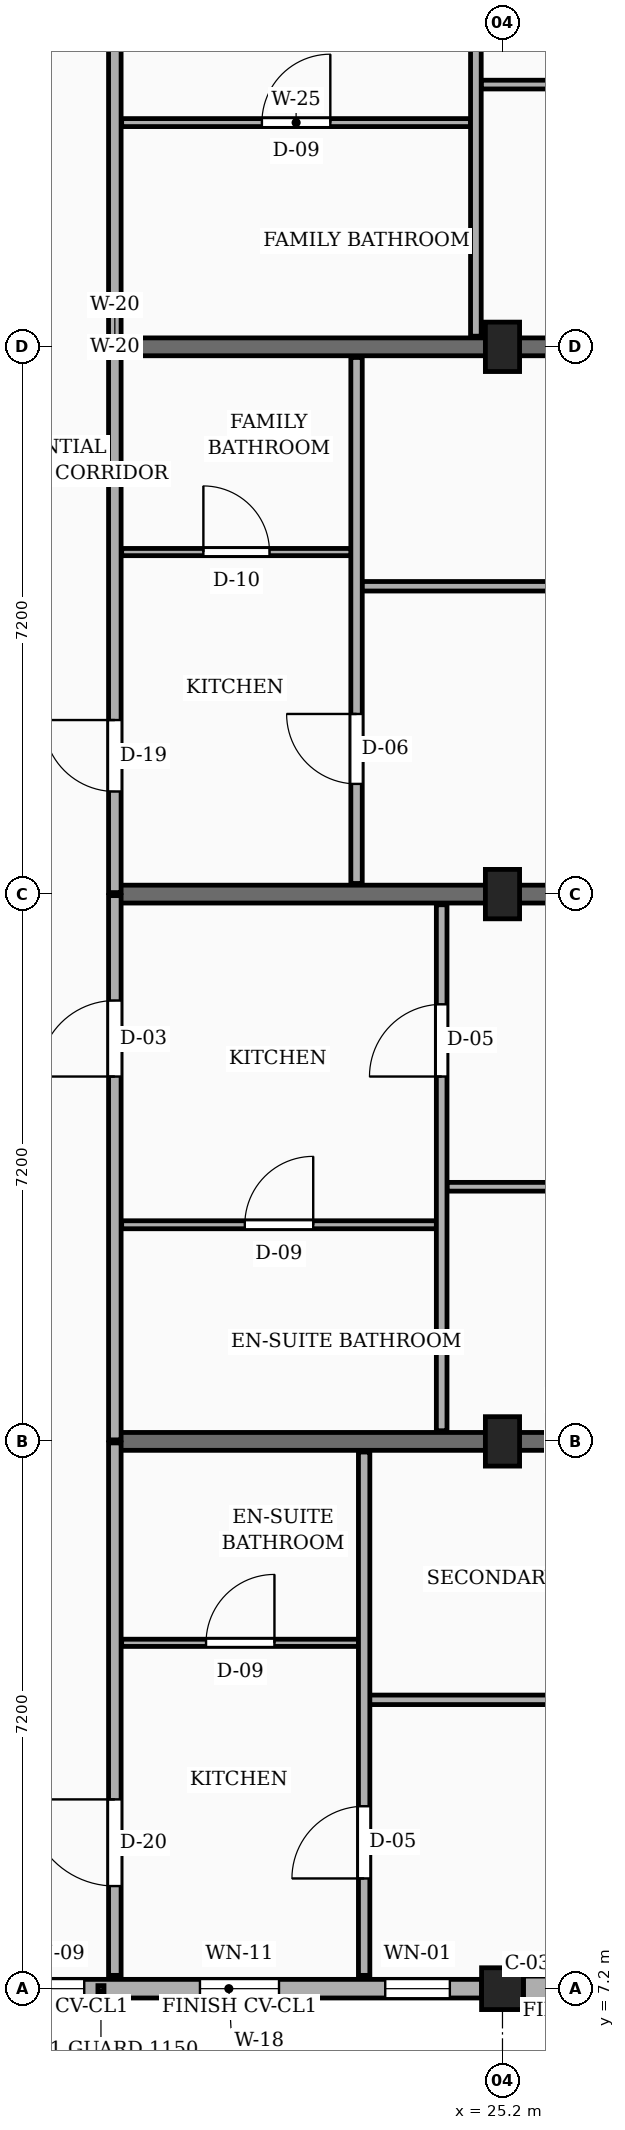
"""IFC4 building model, lengths in metres.
Left out: names, types, materials, properties, quantities, classifications, styles, units other than length and angle.
Written with IfcOpenShell. Run it as: python <this file> out.ifc"""

import sys

from ifc_helpers import new_model, si_unit, direction, frame, frame_2d, origin, origin_2d, place, context, subcontext, project, spatial, rectangle, extrude, element, fill, save


model = new_model("IFC4")
c1 = context("Model", 3, precision=1e-05, world=origin(), true_north=direction((0.0, 1.0)))
c2 = subcontext(c1, "Body", "Model", "MODEL_VIEW")
j1 = project(units=[si_unit("LENGTHUNIT", "METRE"), si_unit("PLANEANGLEUNIT", "RADIAN")], contexts=[c1])
p1 = place(None, origin())
s1 = spatial("IfcSite", under=j1, at=p1, CompositionType="ELEMENT")
p2 = place(p1, origin())
s2 = spatial("IfcBuilding", under=s1, at=p2, CompositionType="ELEMENT")
p3 = place(p2, frame((0.0, 0.0, 13.95)))
s3 = spatial("IfcBuildingStorey", under=s2, at=p3, CompositionType="ELEMENT", Elevation=13.95)
p4 = place(p3, frame((25.2, 7.2, 0.0), z_axis=(0.0, 0.0, 1.0), x_axis=(1.0, 0.0, 0.0)))
e1 = element("IfcColumn", 1, at=p4, inside=s3, PredefinedType="COLUMN", context=c2, shape_type="SweptSolid", body=[
    extrude(rectangle(XDim=0.55, YDim=0.55, at=origin_2d()), origin(), (0.0, 0.0, 1.0), 3.15),
])
for number, where, z_axis, x_axis in (
    (2, (25.2, 14.4, 0.0), (0.0, 0.0, 1.0), (1.0, 0.0, 0.0)),
    (3, (25.2, 21.6, 0.0), (0.0, 0.0, 1.0), (1.0, 0.0, 0.0)),
    (4, (25.2, 28.8, 0.0), (0.0, 0.0, 1.0), (1.0, 0.0, 0.0)),
):
    element("IfcColumn", number, at=place(p3, frame(where, z_axis=z_axis, x_axis=x_axis)), inside=s3, PredefinedType="COLUMN", context=c2, shape_type="SweptSolid", body=[
        extrude(rectangle(XDim=0.45, YDim=0.65, at=origin_2d()), origin(), (0.0, 0.0, 1.0), 3.15),
    ])
for number, where, z_axis, x_axis in (
    (5, (20.1, 14.4, 0.0), (0.0, 0.0, 1.0), (1.0, 0.0, 0.0)),
    (6, (20.1, 21.6, 0.0), (0.0, 0.0, 1.0), (1.0, 0.0, 0.0)),
    (7, (20.1, 28.8, 0.0), (0.0, 0.0, 1.0), (1.0, 0.0, 0.0)),
):
    element("IfcWall", number, at=place(p3, frame(where, z_axis=z_axis, x_axis=x_axis)), inside=s3, PredefinedType="SOLIDWALL", context=c2, shape_type="SweptSolid", body=[
        extrude(rectangle(XDim=12.025, YDim=0.235, at=frame_2d((6.012, 0.0))), origin(), (0.0, 0.0, 1.0), 2.17),
    ])
p5 = place(p3, frame((18.275, 7.2, 0.0), z_axis=(0.0, 0.0, 1.0), x_axis=(1.0, 0.0, 0.0)))
e8 = element("IfcWall", 8, at=p5, inside=s3, PredefinedType="SOLIDWALL", context=c2, shape_type="SweptSolid", body=[
    extrude(rectangle(XDim=6.65, YDim=0.245, at=frame_2d((3.325, 0.0))), origin(), (0.0, 0.0, 1.0), 2.44),
])
p6 = place(p5, frame((0.542, 0.0, 0.78)))
e9 = element("IfcOpeningElement", 9, at=p6, cuts=e8, PredefinedType="OPENING", context=c2, shape_type="SweptSolid", body=[
    extrude(rectangle(XDim=0.88, YDim=1.26, at=frame_2d((0.44, 0.63))), frame((0.0, 0.133, 0.0), z_axis=(0.0, -1.0, 0.0), x_axis=(1.0, 0.0, 0.0)), (0.0, 0.0, 1.0), 0.265),
])
p7 = place(p5, frame((2.945, 0.0, 0.78)))
e10 = element("IfcOpeningElement", 10, at=p7, cuts=e8, PredefinedType="OPENING", context=c2, shape_type="SweptSolid", body=[
    extrude(rectangle(XDim=1.04, YDim=1.26, at=frame_2d((0.52, 0.63))), frame((0.0, 0.133, 0.0), z_axis=(0.0, -1.0, 0.0), x_axis=(1.0, 0.0, 0.0)), (0.0, 0.0, 1.0), 0.265),
])
p8 = place(p5, frame((5.383, 0.0, 0.78)))
e11 = element("IfcOpeningElement", 11, at=p8, cuts=e8, PredefinedType="OPENING", context=c2, shape_type="SweptSolid", body=[
    extrude(rectangle(XDim=0.85, YDim=1.15, at=frame_2d((0.425, 0.575))), frame((0.0, 0.133, 0.0), z_axis=(0.0, -1.0, 0.0), x_axis=(1.0, 0.0, 0.0)), (0.0, 0.0, 1.0), 0.265),
])
p9 = place(p3, frame((25.475, 7.2, 0.0), z_axis=(0.0, 0.0, 1.0), x_axis=(1.0, 0.0, 0.0)))
e12 = element("IfcWall", 12, at=p9, inside=s3, PredefinedType="SOLIDWALL", context=c2, shape_type="SweptSolid", body=[
    extrude(rectangle(XDim=6.65, YDim=0.33, at=frame_2d((3.325, 0.0))), origin(), (0.0, 0.0, 1.0), 2.44),
])
p10 = place(p9, frame((0.45, 0.0, 0.78)))
e13 = element("IfcOpeningElement", 13, at=p10, cuts=e12, PredefinedType="OPENING", context=c2, shape_type="SweptSolid", body=[
    extrude(rectangle(XDim=1.12, YDim=1.26, at=frame_2d((0.56, 0.63))), frame((0.0, 0.175, 0.0), z_axis=(0.0, -1.0, 0.0), x_axis=(1.0, 0.0, 0.0)), (0.0, 0.0, 1.0), 0.35),
])
p11 = place(p9, frame((4.65, 0.0, 0.78)))
e14 = element("IfcOpeningElement", 14, at=p11, cuts=e12, PredefinedType="OPENING", context=c2, shape_type="SweptSolid", body=[
    extrude(rectangle(XDim=1.28, YDim=1.26, at=frame_2d((0.64, 0.63))), frame((0.0, 0.175, 0.0), z_axis=(0.0, -1.0, 0.0), x_axis=(1.0, 0.0, 0.0)), (0.0, 0.0, 1.0), 0.35),
])
p12 = place(p3, frame((20.1, 7.375, 0.0), z_axis=(0.0, 0.0, 1.0), x_axis=(0.0, 1.0, 0.0)))
e15 = element("IfcWall", 15, at=p12, inside=s3, PredefinedType="PARTITIONING", context=c2, shape_type="SweptSolid", body=[
    extrude(rectangle(XDim=7.005, YDim=0.165, at=frame_2d((3.502, 0.0))), origin(), (0.0, 0.0, 1.0), 2.305),
])
p13 = place(p12, frame((1.175, 0.0, 0.0)))
e16 = element("IfcOpeningElement", 16, at=p13, cuts=e15, PredefinedType="OPENING", context=c2, shape_type="SweptSolid", body=[
    extrude(rectangle(XDim=1.14, YDim=2.18, at=frame_2d((0.57, 1.09))), frame((0.0, 0.093, 0.0), z_axis=(0.0, -1.0, 0.0), x_axis=(1.0, 0.0, 0.0)), (0.0, 0.0, 1.0), 0.185),
])
p14 = place(p3, frame((20.1, 14.42, 0.0), z_axis=(0.0, 0.0, 1.0), x_axis=(0.0, 1.0, 0.0)))
e17 = element("IfcWall", 17, at=p14, inside=s3, PredefinedType="PARTITIONING", context=c2, shape_type="SweptSolid", body=[
    extrude(rectangle(XDim=7.16, YDim=0.165, at=frame_2d((3.58, 0.0))), origin(), (0.0, 0.0, 1.0), 2.305),
])
p15 = place(p14, frame((4.78, 0.0, 0.0)))
e18 = element("IfcOpeningElement", 18, at=p15, cuts=e17, PredefinedType="OPENING", context=c2, shape_type="SweptSolid", body=[
    extrude(rectangle(XDim=1.0, YDim=2.15, at=frame_2d((0.5, 1.075))), frame((0.0, 0.093, 0.0), z_axis=(0.0, -1.0, 0.0), x_axis=(1.0, 0.0, 0.0)), (0.0, 0.0, 1.0), 0.185),
])
p16 = place(p3, frame((20.1, 21.62, 0.0), z_axis=(0.0, 0.0, 1.0), x_axis=(0.0, 1.0, 0.0)))
e19 = element("IfcWall", 19, at=p16, inside=s3, PredefinedType="PARTITIONING", context=c2, shape_type="SweptSolid", body=[
    extrude(rectangle(XDim=7.16, YDim=0.165, at=frame_2d((3.58, 0.0))), origin(), (0.0, 0.0, 1.0), 2.305),
])
p17 = place(p16, frame((1.33, 0.0, 0.0)))
e20 = element("IfcOpeningElement", 20, at=p17, cuts=e19, PredefinedType="OPENING", context=c2, shape_type="SweptSolid", body=[
    extrude(rectangle(XDim=0.94, YDim=2.12, at=frame_2d((0.47, 1.06))), frame((0.0, 0.093, 0.0), z_axis=(0.0, -1.0, 0.0), x_axis=(1.0, 0.0, 0.0)), (0.0, 0.0, 1.0), 0.185),
])
p18 = place(p3, frame((20.1, 28.82, 0.0), z_axis=(0.0, 0.0, 1.0), x_axis=(0.0, 1.0, 0.0)))
e21 = element("IfcWall", 21, at=p18, inside=s3, PredefinedType="PARTITIONING", context=c2, shape_type="SweptSolid", body=[
    extrude(rectangle(XDim=7.16, YDim=0.165, at=frame_2d((3.58, 0.0))), origin(), (0.0, 0.0, 1.0), 2.305),
])
p19 = place(p18, frame((4.78, 0.0, 0.0)))
e22 = element("IfcOpeningElement", 22, at=p19, cuts=e21, PredefinedType="OPENING", context=c2, shape_type="SweptSolid", body=[
    extrude(rectangle(XDim=1.14, YDim=2.18, at=frame_2d((0.57, 1.09))), frame((0.0, 0.093, 0.0), z_axis=(0.0, -1.0, 0.0), x_axis=(1.0, 0.0, 0.0)), (0.0, 0.0, 1.0), 0.185),
])
p20 = place(p3, frame((23.45, 11.0, 0.0), z_axis=(0.0, 0.0, 1.0), x_axis=(1.0, 0.0, 0.0)))
e23 = element("IfcWall", 23, at=p20, inside=s3, PredefinedType="PARTITIONING", context=c2, shape_type="SweptSolid", body=[
    extrude(rectangle(XDim=8.775, YDim=0.125, at=frame_2d((4.388, 0.0))), origin(), (0.0, 0.0, 1.0), 2.305),
])
p21 = place(p20, frame((3.938, 0.0, 0.0)))
e24 = element("IfcOpeningElement", 24, at=p21, cuts=e23, PredefinedType="OPENING", context=c2, shape_type="SweptSolid", body=[
    extrude(rectangle(XDim=0.9, YDim=2.1, at=frame_2d((0.45, 1.05))), frame((0.0, 0.073, 0.0), z_axis=(0.0, -1.0, 0.0), x_axis=(1.0, 0.0, 0.0)), (0.0, 0.0, 1.0), 0.145),
])
p22 = place(p3, frame((20.19, 11.75, 0.0), z_axis=(0.0, 0.0, 1.0), x_axis=(1.0, 0.0, 0.0)))
e25 = element("IfcWall", 25, at=p22, inside=s3, PredefinedType="PARTITIONING", context=c2, shape_type="SweptSolid", body=[
    extrude(rectangle(XDim=3.12, YDim=0.095, at=frame_2d((1.56, 0.0))), origin(), (0.0, 0.0, 1.0), 2.305),
])
p23 = place(p22, frame((1.11, 0.0, 0.0)))
e26 = element("IfcOpeningElement", 26, at=p23, cuts=e25, PredefinedType="OPENING", context=c2, shape_type="SweptSolid", body=[
    extrude(rectangle(XDim=0.9, YDim=2.05, at=frame_2d((0.45, 1.025))), frame((0.0, 0.058, 0.0), z_axis=(0.0, -1.0, 0.0), x_axis=(1.0, 0.0, 0.0)), (0.0, 0.0, 1.0), 0.115),
])
p24 = place(p3, frame((23.38, 7.375, 0.0), z_axis=(0.0, 0.0, 1.0), x_axis=(0.0, 1.0, 0.0)))
e27 = element("IfcWall", 27, at=p24, inside=s3, PredefinedType="PARTITIONING", context=c2, shape_type="SweptSolid", body=[
    extrude(rectangle(XDim=6.885, YDim=0.15, at=frame_2d((3.442, 0.0))), origin(), (0.0, 0.0, 1.0), 2.305),
])
p25 = place(p24, frame((1.275, 0.0, 0.0)))
e28 = element("IfcOpeningElement", 28, at=p25, cuts=e27, PredefinedType="OPENING", context=c2, shape_type="SweptSolid", body=[
    extrude(rectangle(XDim=0.95, YDim=2.1, at=frame_2d((0.475, 1.05))), frame((0.0, 0.085, 0.0), z_axis=(0.0, -1.0, 0.0), x_axis=(1.0, 0.0, 0.0)), (0.0, 0.0, 1.0), 0.17),
])
p26 = place(p3, frame((24.47, 17.75, 0.0), z_axis=(0.0, 0.0, 1.0), x_axis=(1.0, 0.0, 0.0)))
e29 = element("IfcWall", 29, at=p26, inside=s3, PredefinedType="PARTITIONING", context=c2, shape_type="SweptSolid", body=[
    extrude(rectangle(XDim=7.755, YDim=0.115, at=frame_2d((3.877, 0.0))), origin(), (0.0, 0.0, 1.0), 2.305),
])
p27 = place(p26, frame((3.427, 0.0, 0.0)))
e30 = element("IfcOpeningElement", 30, at=p27, cuts=e29, PredefinedType="OPENING", context=c2, shape_type="SweptSolid", body=[
    extrude(rectangle(XDim=0.9, YDim=2.1, at=frame_2d((0.45, 1.05))), frame((0.0, 0.067, 0.0), z_axis=(0.0, -1.0, 0.0), x_axis=(1.0, 0.0, 0.0)), (0.0, 0.0, 1.0), 0.135),
])
p28 = place(p3, frame((20.19, 17.25, 0.0), z_axis=(0.0, 0.0, 1.0), x_axis=(1.0, 0.0, 0.0)))
e31 = element("IfcWall", 31, at=p28, inside=s3, PredefinedType="PARTITIONING", context=c2, shape_type="SweptSolid", body=[
    extrude(rectangle(XDim=4.14, YDim=0.105, at=frame_2d((2.07, 0.0))), origin(), (0.0, 0.0, 1.0), 2.305),
])
p29 = place(p28, frame((1.62, 0.0, 0.0)))
e32 = element("IfcOpeningElement", 32, at=p29, cuts=e31, PredefinedType="OPENING", context=c2, shape_type="SweptSolid", body=[
    extrude(rectangle(XDim=0.9, YDim=2.05, at=frame_2d((0.45, 1.025))), frame((0.0, 0.062, 0.0), z_axis=(0.0, -1.0, 0.0), x_axis=(1.0, 0.0, 0.0)), (0.0, 0.0, 1.0), 0.125),
])
p30 = place(p3, frame((24.4, 14.54, 0.0), z_axis=(0.0, 0.0, 1.0), x_axis=(0.0, 1.0, 0.0)))
e33 = element("IfcWall", 33, at=p30, inside=s3, PredefinedType="PARTITIONING", context=c2, shape_type="SweptSolid", body=[
    extrude(rectangle(XDim=6.92, YDim=0.14, at=frame_2d((3.46, 0.0))), origin(), (0.0, 0.0, 1.0), 2.305),
])
p31 = place(p30, frame((4.66, 0.0, 0.0)))
e34 = element("IfcOpeningElement", 34, at=p31, cuts=e33, PredefinedType="OPENING", context=c2, shape_type="SweptSolid", body=[
    extrude(rectangle(XDim=0.95, YDim=2.1, at=frame_2d((0.475, 1.05))), frame((0.0, 0.08, 0.0), z_axis=(0.0, -1.0, 0.0), x_axis=(1.0, 0.0, 0.0)), (0.0, 0.0, 1.0), 0.16),
])
p32 = place(p3, frame((23.35, 25.65, 0.0), z_axis=(0.0, 0.0, 1.0), x_axis=(1.0, 0.0, 0.0)))
e35 = element("IfcWall", 35, at=p32, inside=s3, PredefinedType="PARTITIONING", context=c2, shape_type="SweptSolid", body=[
    extrude(rectangle(XDim=8.875, YDim=0.125, at=frame_2d((4.438, 0.0))), origin(), (0.0, 0.0, 1.0), 2.305),
])
p33 = place(p32, frame((3.998, 0.0, 0.0)))
e36 = element("IfcOpeningElement", 36, at=p33, cuts=e35, PredefinedType="OPENING", context=c2, shape_type="SweptSolid", body=[
    extrude(rectangle(XDim=0.88, YDim=2.08, at=frame_2d((0.44, 1.04))), frame((0.0, 0.073, 0.0), z_axis=(0.0, -1.0, 0.0), x_axis=(1.0, 0.0, 0.0)), (0.0, 0.0, 1.0), 0.145),
])
p34 = place(p3, frame((20.19, 26.1, 0.0), z_axis=(0.0, 0.0, 1.0), x_axis=(1.0, 0.0, 0.0)))
e37 = element("IfcWall", 37, at=p34, inside=s3, PredefinedType="PARTITIONING", context=c2, shape_type="SweptSolid", body=[
    extrude(rectangle(XDim=3.02, YDim=0.095, at=frame_2d((1.51, 0.0))), origin(), (0.0, 0.0, 1.0), 2.305),
])
p35 = place(p34, frame((1.075, 0.0, 0.0)))
e38 = element("IfcOpeningElement", 38, at=p35, cuts=e37, PredefinedType="OPENING", context=c2, shape_type="SweptSolid", body=[
    extrude(rectangle(XDim=0.87, YDim=2.05, at=frame_2d((0.435, 1.025))), frame((0.0, 0.058, 0.0), z_axis=(0.0, -1.0, 0.0), x_axis=(1.0, 0.0, 0.0)), (0.0, 0.0, 1.0), 0.115),
])
p36 = place(p3, frame((23.28, 21.74, 0.0), z_axis=(0.0, 0.0, 1.0), x_axis=(0.0, 1.0, 0.0)))
e39 = element("IfcWall", 39, at=p36, inside=s3, PredefinedType="PARTITIONING", context=c2, shape_type="SweptSolid", body=[
    extrude(rectangle(XDim=6.92, YDim=0.15, at=frame_2d((3.46, 0.0))), origin(), (0.0, 0.0, 1.0), 2.305),
])
p37 = place(p36, frame((1.31, 0.0, 0.0)))
e40 = element("IfcOpeningElement", 40, at=p37, cuts=e39, PredefinedType="OPENING", context=c2, shape_type="SweptSolid", body=[
    extrude(rectangle(XDim=0.92, YDim=2.1, at=frame_2d((0.46, 1.05))), frame((0.0, 0.085, 0.0), z_axis=(0.0, -1.0, 0.0), x_axis=(1.0, 0.0, 0.0)), (0.0, 0.0, 1.0), 0.17),
])
p38 = place(p3, frame((24.92, 32.25, 0.0), z_axis=(0.0, 0.0, 1.0), x_axis=(1.0, 0.0, 0.0)))
e41 = element("IfcWall", 41, at=p38, inside=s3, PredefinedType="PARTITIONING", context=c2, shape_type="SweptSolid", body=[
    extrude(rectangle(XDim=7.305, YDim=0.115, at=frame_2d((3.653, 0.0))), origin(), (0.0, 0.0, 1.0), 2.305),
])
p39 = place(p38, frame((3.202, 0.0, 0.0)))
e42 = element("IfcOpeningElement", 42, at=p39, cuts=e41, PredefinedType="OPENING", context=c2, shape_type="SweptSolid", body=[
    extrude(rectangle(XDim=0.9, YDim=2.1, at=frame_2d((0.45, 1.05))), frame((0.0, 0.067, 0.0), z_axis=(0.0, -1.0, 0.0), x_axis=(1.0, 0.0, 0.0)), (0.0, 0.0, 1.0), 0.135),
])
p40 = place(p3, frame((20.19, 31.75, 0.0), z_axis=(0.0, 0.0, 1.0), x_axis=(1.0, 0.0, 0.0)))
e43 = element("IfcWall", 43, at=p40, inside=s3, PredefinedType="PARTITIONING", context=c2, shape_type="SweptSolid", body=[
    extrude(rectangle(XDim=4.59, YDim=0.105, at=frame_2d((2.295, 0.0))), origin(), (0.0, 0.0, 1.0), 2.305),
])
p41 = place(p40, frame((1.845, 0.0, 0.0)))
e44 = element("IfcOpeningElement", 44, at=p41, cuts=e43, PredefinedType="OPENING", context=c2, shape_type="SweptSolid", body=[
    extrude(rectangle(XDim=0.9, YDim=2.05, at=frame_2d((0.45, 1.025))), frame((0.0, 0.062, 0.0), z_axis=(0.0, -1.0, 0.0), x_axis=(1.0, 0.0, 0.0)), (0.0, 0.0, 1.0), 0.125),
])
p42 = place(p3, frame((24.85, 28.94, 0.0), z_axis=(0.0, 0.0, 1.0), x_axis=(0.0, 1.0, 0.0)))
e45 = element("IfcWall", 45, at=p42, inside=s3, PredefinedType="PARTITIONING", context=c2, shape_type="SweptSolid", body=[
    extrude(rectangle(XDim=6.92, YDim=0.14, at=frame_2d((3.46, 0.0))), origin(), (0.0, 0.0, 1.0), 2.305),
])
p43 = place(p42, frame((4.66, 0.0, 0.0)))
e46 = element("IfcOpeningElement", 46, at=p43, cuts=e45, PredefinedType="OPENING", context=c2, shape_type="SweptSolid", body=[
    extrude(rectangle(XDim=0.95, YDim=2.1, at=frame_2d((0.475, 1.05))), frame((0.0, 0.08, 0.0), z_axis=(0.0, -1.0, 0.0), x_axis=(1.0, 0.0, 0.0)), (0.0, 0.0, 1.0), 0.16),
])
p44 = place(p6, origin())
e47 = element("IfcWindow", 47, at=p44, inside=s3, PartitioningType="SINGLE_PANEL", PredefinedType="WINDOW", context=c2, shape_type="SweptSolid", body=[
    extrude(rectangle(XDim=0.88, YDim=1.26, at=frame_2d((0.44, 0.63))), frame((0.0, 0.03, 0.0), z_axis=(0.0, -1.0, 0.0), x_axis=(1.0, 0.0, 0.0)), (0.0, 0.0, 1.0), 0.06),
])
fill(e9, e47)
p45 = place(p7, origin())
e48 = element("IfcWindow", 48, at=p45, inside=s3, PartitioningType="SINGLE_PANEL", PredefinedType="WINDOW", context=c2, shape_type="SweptSolid", body=[
    extrude(rectangle(XDim=1.04, YDim=1.26, at=frame_2d((0.52, 0.63))), frame((0.0, 0.03, 0.0), z_axis=(0.0, -1.0, 0.0), x_axis=(1.0, 0.0, 0.0)), (0.0, 0.0, 1.0), 0.06),
])
fill(e10, e48)
p46 = place(p8, origin())
e49 = element("IfcWindow", 49, at=p46, inside=s3, PartitioningType="SINGLE_PANEL", PredefinedType="WINDOW", context=c2, shape_type="SweptSolid", body=[
    extrude(rectangle(XDim=0.85, YDim=1.15, at=frame_2d((0.425, 0.575))), frame((0.0, 0.03, 0.0), z_axis=(0.0, -1.0, 0.0), x_axis=(1.0, 0.0, 0.0)), (0.0, 0.0, 1.0), 0.06),
])
fill(e11, e49)
p47 = place(p13, origin())
e50 = element("IfcDoor", 50, at=p47, inside=s3, OperationType="SINGLE_SWING_RIGHT", PredefinedType="DOOR", context=c2, shape_type="SweptSolid", body=[
    extrude(rectangle(XDim=1.14, YDim=2.18, at=frame_2d((0.57, 1.09))), frame((0.0, 0.025, 0.0), z_axis=(0.0, -1.0, 0.0), x_axis=(1.0, 0.0, 0.0)), (0.0, 0.0, 1.0), 0.05),
])
fill(e16, e50)
p48 = place(p15, origin())
e51 = element("IfcDoor", 51, at=p48, inside=s3, OperationType="SINGLE_SWING_LEFT", PredefinedType="DOOR", context=c2, shape_type="SweptSolid", body=[
    extrude(rectangle(XDim=1.0, YDim=2.15, at=frame_2d((0.5, 1.075))), frame((0.0, 0.025, 0.0), z_axis=(0.0, -1.0, 0.0), x_axis=(1.0, 0.0, 0.0)), (0.0, 0.0, 1.0), 0.05),
])
fill(e18, e51)
p49 = place(p17, origin())
e52 = element("IfcDoor", 52, at=p49, inside=s3, OperationType="SINGLE_SWING_RIGHT", PredefinedType="DOOR", context=c2, shape_type="SweptSolid", body=[
    extrude(rectangle(XDim=0.94, YDim=2.12, at=frame_2d((0.47, 1.06))), frame((0.0, 0.025, 0.0), z_axis=(0.0, -1.0, 0.0), x_axis=(1.0, 0.0, 0.0)), (0.0, 0.0, 1.0), 0.05),
])
fill(e20, e52)
p50 = place(p23, origin())
e53 = element("IfcDoor", 53, at=p50, inside=s3, OperationType="SINGLE_SWING_RIGHT", PredefinedType="DOOR", context=c2, shape_type="SweptSolid", body=[
    extrude(rectangle(XDim=0.9, YDim=2.05, at=frame_2d((0.45, 1.025))), frame((0.0, 0.025, 0.0), z_axis=(0.0, -1.0, 0.0), x_axis=(1.0, 0.0, 0.0)), (0.0, 0.0, 1.0), 0.05),
])
fill(e26, e53)
p51 = place(p25, origin())
e54 = element("IfcDoor", 54, at=p51, inside=s3, OperationType="SINGLE_SWING_LEFT", PredefinedType="DOOR", context=c2, shape_type="SweptSolid", body=[
    extrude(rectangle(XDim=0.95, YDim=2.1, at=frame_2d((0.475, 1.05))), frame((0.0, 0.025, 0.0), z_axis=(0.0, -1.0, 0.0), x_axis=(1.0, 0.0, 0.0)), (0.0, 0.0, 1.0), 0.05),
])
fill(e28, e54)
p52 = place(p29, origin())
e55 = element("IfcDoor", 55, at=p52, inside=s3, OperationType="SINGLE_SWING_RIGHT", PredefinedType="DOOR", context=c2, shape_type="SweptSolid", body=[
    extrude(rectangle(XDim=0.9, YDim=2.05, at=frame_2d((0.45, 1.025))), frame((0.0, 0.025, 0.0), z_axis=(0.0, -1.0, 0.0), x_axis=(1.0, 0.0, 0.0)), (0.0, 0.0, 1.0), 0.05),
])
fill(e32, e55)
p53 = place(p31, origin())
e56 = element("IfcDoor", 56, at=p53, inside=s3, OperationType="SINGLE_SWING_LEFT", PredefinedType="DOOR", context=c2, shape_type="SweptSolid", body=[
    extrude(rectangle(XDim=0.95, YDim=2.1, at=frame_2d((0.475, 1.05))), frame((0.0, 0.025, 0.0), z_axis=(0.0, -1.0, 0.0), x_axis=(1.0, 0.0, 0.0)), (0.0, 0.0, 1.0), 0.05),
])
fill(e34, e56)
p54 = place(p35, origin())
e57 = element("IfcDoor", 57, at=p54, inside=s3, OperationType="SINGLE_SWING_LEFT", PredefinedType="DOOR", context=c2, shape_type="SweptSolid", body=[
    extrude(rectangle(XDim=0.87, YDim=2.05, at=frame_2d((0.435, 1.025))), frame((0.0, 0.025, 0.0), z_axis=(0.0, -1.0, 0.0), x_axis=(1.0, 0.0, 0.0)), (0.0, 0.0, 1.0), 0.05),
])
fill(e38, e57)
p55 = place(p37, origin())
e58 = element("IfcDoor", 58, at=p55, inside=s3, OperationType="SINGLE_SWING_RIGHT", PredefinedType="DOOR", context=c2, shape_type="SweptSolid", body=[
    extrude(rectangle(XDim=0.92, YDim=2.1, at=frame_2d((0.46, 1.05))), frame((0.0, 0.025, 0.0), z_axis=(0.0, -1.0, 0.0), x_axis=(1.0, 0.0, 0.0)), (0.0, 0.0, 1.0), 0.05),
])
fill(e40, e58)
p56 = place(p41, origin())
e59 = element("IfcDoor", 59, at=p56, inside=s3, OperationType="SINGLE_SWING_RIGHT", PredefinedType="DOOR", context=c2, shape_type="SweptSolid", body=[
    extrude(rectangle(XDim=0.9, YDim=2.05, at=frame_2d((0.45, 1.025))), frame((0.0, 0.025, 0.0), z_axis=(0.0, -1.0, 0.0), x_axis=(1.0, 0.0, 0.0)), (0.0, 0.0, 1.0), 0.05),
])
fill(e44, e59)
save(model, sys.argv[1])
